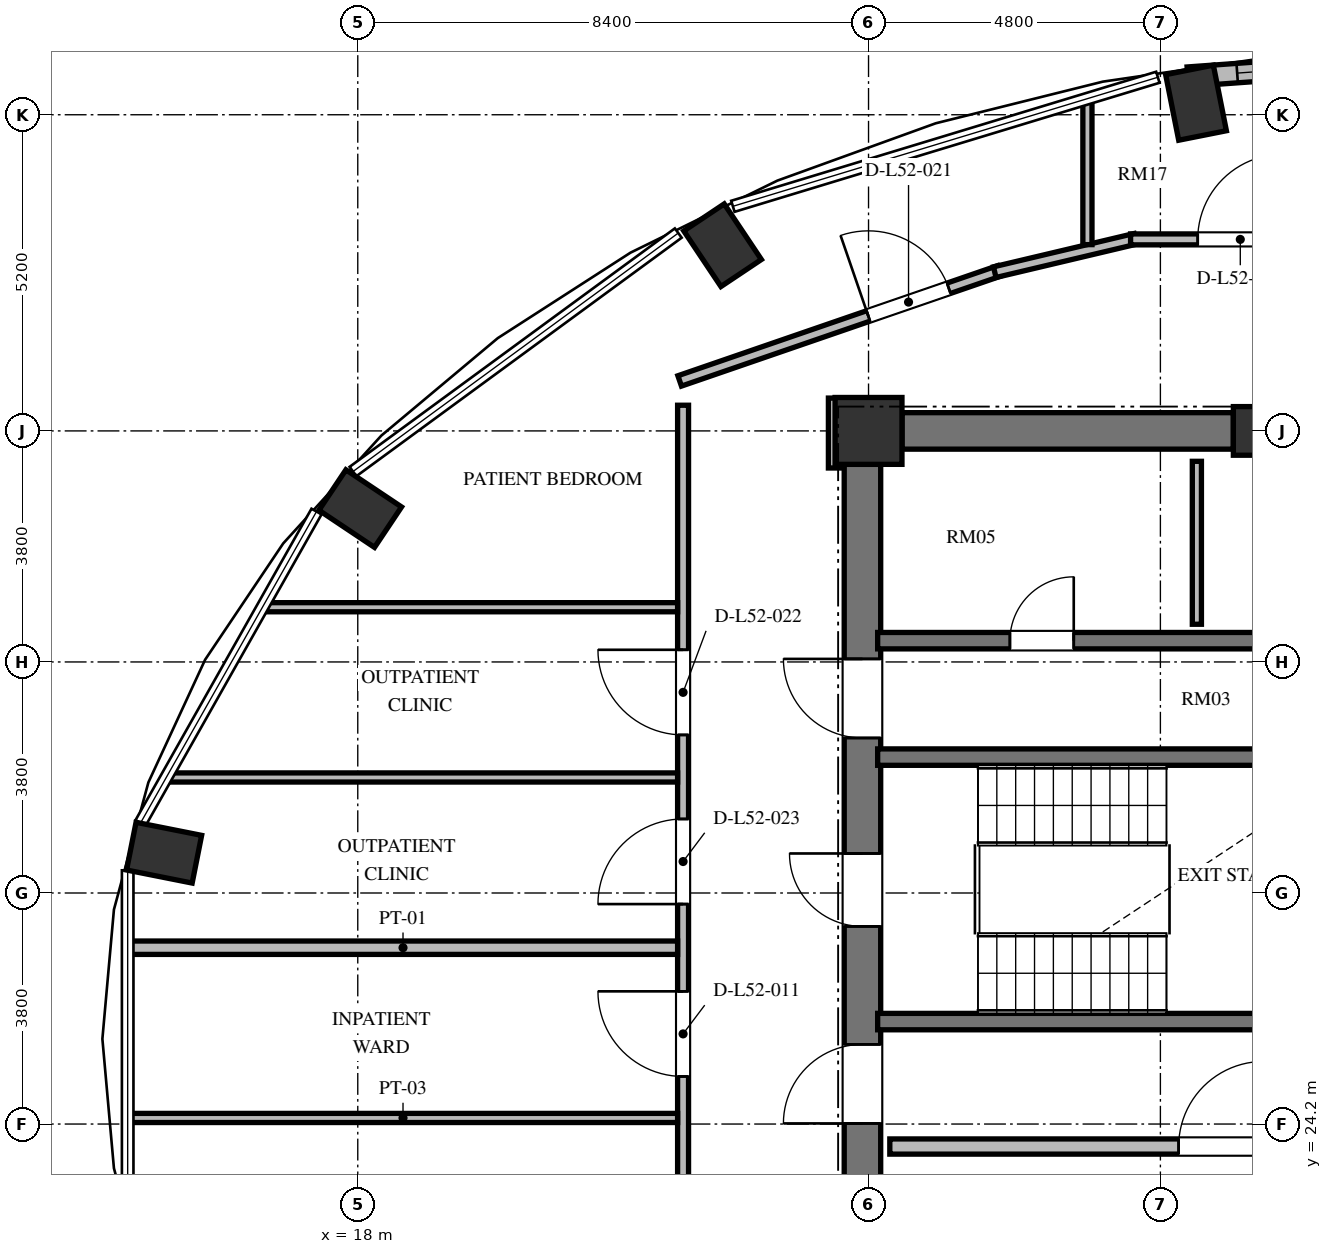
"""IFC4 building model, lengths in metres.
Left out: names, types, materials, properties, quantities, classifications, styles, units other than length and angle.
Written with IfcOpenShell. Run it as: python <this file> out.ifc"""

import sys

from ifc_helpers import new_model, si_unit, direction, frame, frame_2d, origin, origin_2d, place, context, subcontext, project, spatial, rectangle, extrude, element, fill, save


model = new_model("IFC4")
c1 = context("Model", 3, precision=1e-05, world=origin(), true_north=direction((0.0, 1.0)))
c2 = subcontext(c1, "Body", "Model", "MODEL_VIEW")
j1 = project(units=[si_unit("LENGTHUNIT", "METRE"), si_unit("PLANEANGLEUNIT", "RADIAN")], contexts=[c1])
p1 = place(None, origin())
s1 = spatial("IfcSite", under=j1, at=p1, CompositionType="ELEMENT")
p2 = place(p1, origin())
s2 = spatial("IfcBuilding", under=s1, at=p2, CompositionType="ELEMENT")
p3 = place(p2, frame((0.0, 0.0, 202.128)))
s3 = spatial("IfcBuildingStorey", under=s2, at=p3, CompositionType="ELEMENT", Elevation=202.128)
for number, where, z_axis, x_axis in (
    (1, (31.786, 40.998, 0.0), (0.0, 0.0, 1.0), (-0.195, 0.981, 0.0)),
    (2, (24.0, 38.654, 0.0), (0.0, 0.0, 1.0), (-0.556, 0.831, 0.0)),
    (3, (18.04, 34.323, 0.0), (0.0, 0.0, 1.0), (-0.831, 0.556, 0.0)),
    (4, (14.815, 28.663, 0.0), (0.0, 0.0, 1.0), (-0.981, 0.195, 0.0)),
):
    element("IfcColumn", number, at=place(p3, frame(where, z_axis=z_axis, x_axis=x_axis)), inside=s3, PredefinedType="COLUMN", context=c2, shape_type="SweptSolid", body=[
        extrude(rectangle(XDim=1.1, YDim=0.8, at=origin_2d()), origin(), (0.0, 0.0, 1.0), 3.648),
    ])
p4 = place(p3, frame((32.8, 35.6, 0.0), z_axis=(0.0, 0.0, 1.0), x_axis=(1.0, 0.0, 0.0)))
e5 = element("IfcColumn", 5, at=p4, inside=s3, PredefinedType="COLUMN", context=c2, shape_type="SweptSolid", body=[
    extrude(rectangle(XDim=0.8, YDim=0.8, at=origin_2d()), origin(), (0.0, 0.0, 1.0), 3.648),
])
p5 = place(p3, frame((26.4, 35.6, 0.0), z_axis=(0.0, 0.0, 1.0), x_axis=(1.0, 0.0, 0.0)))
e6 = element("IfcColumn", 6, at=p5, inside=s3, PredefinedType="COLUMN", context=c2, shape_type="SweptSolid", body=[
    extrude(rectangle(XDim=1.1, YDim=1.1, at=origin_2d()), origin(), (0.0, 0.0, 1.0), 3.648),
])
p6 = place(p3, frame((26.3, 20.95, 0.0), z_axis=(0.0, 0.0, 1.0), x_axis=(0.0, 1.0, 0.0)))
e7 = element("IfcWall", 7, at=p6, inside=s3, PredefinedType="SHEAR", context=c2, shape_type="SweptSolid", body=[
    extrude(rectangle(XDim=14.1, YDim=0.6, at=frame_2d((7.05, 0.0))), origin(), (0.0, 0.0, 1.0), 3.648),
])
p7 = place(p6, frame((6.5, 0.0, 0.0)))
e8 = element("IfcOpeningElement", 8, at=p7, cuts=e7, PredefinedType="OPENING", context=c2, shape_type="SweptSolid", body=[
    extrude(rectangle(XDim=1.2, YDim=2.15, at=frame_2d((0.6, 1.075))), frame((0.0, 0.31, 0.0), z_axis=(0.0, -1.0, 0.0), x_axis=(1.0, 0.0, 0.0)), (0.0, 0.0, 1.0), 0.62),
])
p8 = place(p6, frame((9.6, 0.0, 0.0)))
e9 = element("IfcOpeningElement", 9, at=p8, cuts=e7, PredefinedType="OPENING", context=c2, shape_type="SweptSolid", body=[
    extrude(rectangle(XDim=1.3, YDim=2.2, at=frame_2d((0.65, 1.1))), frame((0.0, 0.31, 0.0), z_axis=(0.0, -1.0, 0.0), x_axis=(1.0, 0.0, 0.0)), (0.0, 0.0, 1.0), 0.62),
])
p9 = place(p6, frame((3.26, 0.0, 0.0)))
e10 = element("IfcOpeningElement", 10, at=p9, cuts=e7, PredefinedType="OPENING", context=c2, shape_type="SweptSolid", body=[
    extrude(rectangle(XDim=1.3, YDim=2.2, at=frame_2d((0.65, 1.1))), frame((0.0, 0.31, 0.0), z_axis=(0.0, -1.0, 0.0), x_axis=(1.0, 0.0, 0.0)), (0.0, 0.0, 1.0), 0.62),
])
p10 = place(p3, frame((26.95, 35.6, 0.0), z_axis=(0.0, 0.0, 1.0), x_axis=(1.0, 0.0, 0.0)))
e11 = element("IfcWall", 11, at=p10, inside=s3, PredefinedType="SHEAR", context=c2, shape_type="SweptSolid", body=[
    extrude(rectangle(XDim=5.45, YDim=0.6, at=frame_2d((2.725, 0.0))), origin(), (0.0, 0.0, 1.0), 3.648),
])
p11 = place(p3, frame((36.179, 41.753, 0.0), z_axis=(0.0, 0.0, 1.0), x_axis=(-0.997408782787, -0.071942477163, 0.0)))
e12 = element("IfcWall", 12, at=p11, inside=s3, PredefinedType="SOLIDWALL", context=c2, shape_type="SweptSolid", body=[
    extrude(rectangle(XDim=4.541, YDim=0.32, at=frame_2d((2.27, 0.0))), origin(), (0.0, 0.0, 1.0), 3.448),
])
p12 = place(p11, frame((2.526, 0.0, 0.85)))
e13 = element("IfcOpeningElement", 13, at=p12, cuts=e12, PredefinedType="OPENING", context=c2, shape_type="SweptSolid", body=[
    extrude(rectangle(XDim=1.2, YDim=1.8, at=frame_2d((0.6, 0.9))), frame((0.0, 0.17, 0.0), z_axis=(0.0, -1.0, 0.0), x_axis=(1.0, 0.0, 0.0)), (0.0, 0.0, 1.0), 0.34),
])
for number, where, z_axis, x_axis in (
    (14, (26.55, 30.235, 0.0), (0.0, 0.0, 1.0), (1.0, 0.0, 0.0)),
    (15, (26.55, 25.885, 0.0), (0.0, 0.0, 1.0), (1.0, 0.0, 0.0)),
):
    element("IfcWall", number, at=place(p3, frame(where, z_axis=z_axis, x_axis=x_axis)), inside=s3, PredefinedType="SHEAR", context=c2, shape_type="SweptSolid", body=[
        extrude(rectangle(XDim=7.985, YDim=0.27, at=frame_2d((3.992, 0.0))), origin(), (0.0, 0.0, 1.0), 3.648),
    ])
p13 = place(p3, frame((26.55, 32.15, 0.0), z_axis=(0.0, 0.0, 1.0), x_axis=(1.0, 0.0, 0.0)))
e16 = element("IfcWall", 16, at=p13, inside=s3, PredefinedType="SHEAR", context=c2, shape_type="SweptSolid", body=[
    extrude(rectangle(XDim=16.4, YDim=0.27, at=frame_2d((8.2, 0.0))), origin(), (0.0, 0.0, 1.0), 3.648),
])
p14 = place(p13, frame((2.175, 0.0, 0.0)))
e17 = element("IfcOpeningElement", 17, at=p14, cuts=e16, PredefinedType="OPENING", context=c2, shape_type="SweptSolid", body=[
    extrude(rectangle(XDim=1.05, YDim=2.15, at=frame_2d((0.525, 1.075))), frame((0.0, 0.145, 0.0), z_axis=(0.0, -1.0, 0.0), x_axis=(1.0, 0.0, 0.0)), (0.0, 0.0, 1.0), 0.29),
])
p15 = place(p13, frame((7.575, 0.0, 0.0)))
e18 = element("IfcOpeningElement", 18, at=p15, cuts=e16, PredefinedType="OPENING", context=c2, shape_type="SweptSolid", body=[
    extrude(rectangle(XDim=1.05, YDim=2.15, at=frame_2d((0.525, 1.075))), frame((0.0, 0.145, 0.0), z_axis=(0.0, -1.0, 0.0), x_axis=(1.0, 0.0, 0.0)), (0.0, 0.0, 1.0), 0.29),
])
p16 = place(p13, frame((11.9, 0.0, 0.0)))
e19 = element("IfcOpeningElement", 19, at=p16, cuts=e16, PredefinedType="OPENING", context=c2, shape_type="SweptSolid", body=[
    extrude(rectangle(XDim=1.1, YDim=2.2, at=frame_2d((0.55, 1.1))), frame((0.0, 0.145, 0.0), z_axis=(0.0, -1.0, 0.0), x_axis=(1.0, 0.0, 0.0)), (0.0, 0.0, 1.0), 0.29),
])
p17 = place(p13, frame((14.5, 0.0, 0.0)))
e20 = element("IfcOpeningElement", 20, at=p17, cuts=e16, PredefinedType="OPENING", context=c2, shape_type="SweptSolid", body=[
    extrude(rectangle(XDim=1.1, YDim=2.2, at=frame_2d((0.55, 1.1))), frame((0.0, 0.145, 0.0), z_axis=(0.0, -1.0, 0.0), x_axis=(1.0, 0.0, 0.0)), (0.0, 0.0, 1.0), 0.29),
])
p18 = place(p3, frame((26.75, 23.83, 0.0), z_axis=(0.0, 0.0, 1.0), x_axis=(1.0, 0.0, 0.0)))
e21 = element("IfcWall", 21, at=p18, inside=s3, PredefinedType="SOLIDWALL", context=c2, shape_type="SweptSolid", body=[
    extrude(rectangle(XDim=16.2, YDim=0.25, at=frame_2d((8.1, 0.0))), origin(), (0.0, 0.0, 1.0), 3.448),
])
p19 = place(p18, frame((4.75, 0.0, 0.0)))
e22 = element("IfcOpeningElement", 22, at=p19, cuts=e21, PredefinedType="OPENING", context=c2, shape_type="SweptSolid", body=[
    extrude(rectangle(XDim=1.4, YDim=2.2, at=frame_2d((0.7, 1.1))), frame((0.0, 0.135, 0.0), z_axis=(0.0, -1.0, 0.0), x_axis=(1.0, 0.0, 0.0)), (0.0, 0.0, 1.0), 0.27),
])
p20 = place(p18, frame((11.7, 0.0, 0.0)))
e23 = element("IfcOpeningElement", 23, at=p20, cuts=e21, PredefinedType="OPENING", context=c2, shape_type="SweptSolid", body=[
    extrude(rectangle(XDim=1.1, YDim=2.2, at=frame_2d((0.55, 1.1))), frame((0.0, 0.135, 0.0), z_axis=(0.0, -1.0, 0.0), x_axis=(1.0, 0.0, 0.0)), (0.0, 0.0, 1.0), 0.27),
])
p21 = place(p18, frame((14.15, 0.0, 0.0)))
e24 = element("IfcOpeningElement", 24, at=p21, cuts=e21, PredefinedType="OPENING", context=c2, shape_type="SweptSolid", body=[
    extrude(rectangle(XDim=1.4, YDim=2.3, at=frame_2d((0.7, 1.15))), frame((0.0, 0.135, 0.0), z_axis=(0.0, -1.0, 0.0), x_axis=(1.0, 0.0, 0.0)), (0.0, 0.0, 1.0), 0.27),
])
p22 = place(p3, frame((31.8, 32.42, 0.0), z_axis=(0.0, 0.0, 1.0), x_axis=(0.0, 1.0, 0.0)))
e25 = element("IfcWall", 25, at=p22, inside=s3, PredefinedType="PARTITIONING", context=c2, shape_type="SweptSolid", body=[
    extrude(rectangle(XDim=2.68, YDim=0.15, at=frame_2d((1.34, 0.0))), origin(), (0.0, 0.0, 1.0), 3.448),
])
p23 = place(p3, frame((23.294, 36.422, 0.0), z_axis=(0.0, 0.0, 1.0), x_axis=(0.945493277461, 0.325641616316, 0.0)))
e26 = element("IfcWall", 26, at=p23, inside=s3, PredefinedType="PARTITIONING", context=c2, shape_type="SweptSolid", body=[
    extrude(rectangle(XDim=5.562, YDim=0.18, at=frame_2d((2.781, 0.0))), origin(), (0.0, 0.0, 1.0), 3.073),
])
p24 = place(p23, frame((3.281, 0.0, 0.0)))
e27 = element("IfcOpeningElement", 27, at=p24, cuts=e26, PredefinedType="OPENING", context=c2, shape_type="SweptSolid", body=[
    extrude(rectangle(XDim=1.4, YDim=2.2, at=frame_2d((0.7, 1.1))), frame((0.0, 0.1, 0.0), z_axis=(0.0, -1.0, 0.0), x_axis=(1.0, 0.0, 0.0)), (0.0, 0.0, 1.0), 0.2),
])
p25 = place(p3, frame((28.476, 38.211, 0.0), z_axis=(0.0, 0.0, 1.0), x_axis=(0.973030562203, 0.230676234189, 0.0)))
e28 = element("IfcWall", 28, at=p25, inside=s3, PredefinedType="PARTITIONING", context=c2, shape_type="SweptSolid", body=[
    extrude(rectangle(XDim=2.377, YDim=0.18, at=frame_2d((1.188, 0.0))), origin(), (0.0, 0.0, 1.0), 3.448),
])
p26 = place(p3, frame((30.71, 38.75, 0.0), z_axis=(0.0, 0.0, 1.0), x_axis=(1.0, 0.0, 0.0)))
e29 = element("IfcWall", 29, at=p26, inside=s3, PredefinedType="PARTITIONING", context=c2, shape_type="SweptSolid", body=[
    extrude(rectangle(XDim=20.815, YDim=0.18, at=frame_2d((10.408, 0.0))), origin(), (0.0, 0.0, 1.0), 3.073),
])
p27 = place(p26, frame((17.194, 0.0, 0.0)))
e30 = element("IfcOpeningElement", 30, at=p27, cuts=e29, PredefinedType="OPENING", context=c2, shape_type="SweptSolid", body=[
    extrude(rectangle(XDim=1.4, YDim=2.2, at=frame_2d((0.7, 1.1))), frame((0.0, 0.1, 0.0), z_axis=(0.0, -1.0, 0.0), x_axis=(1.0, 0.0, 0.0)), (0.0, 0.0, 1.0), 0.2),
])
p28 = place(p26, frame((12.59, 0.0, 0.0)))
e31 = element("IfcOpeningElement", 31, at=p28, cuts=e29, PredefinedType="OPENING", context=c2, shape_type="SweptSolid", body=[
    extrude(rectangle(XDim=1.4, YDim=2.2, at=frame_2d((0.7, 1.1))), frame((0.0, 0.1, 0.0), z_axis=(0.0, -1.0, 0.0), x_axis=(1.0, 0.0, 0.0)), (0.0, 0.0, 1.0), 0.2),
])
p29 = place(p26, frame((8.59, 0.0, 0.0)))
e32 = element("IfcOpeningElement", 32, at=p29, cuts=e29, PredefinedType="OPENING", context=c2, shape_type="SweptSolid", body=[
    extrude(rectangle(XDim=1.4, YDim=2.2, at=frame_2d((0.7, 1.1))), frame((0.0, 0.1, 0.0), z_axis=(0.0, -1.0, 0.0), x_axis=(1.0, 0.0, 0.0)), (0.0, 0.0, 1.0), 0.2),
])
p30 = place(p26, frame((4.59, 0.0, 0.0)))
e33 = element("IfcOpeningElement", 33, at=p30, cuts=e29, PredefinedType="OPENING", context=c2, shape_type="SweptSolid", body=[
    extrude(rectangle(XDim=1.4, YDim=2.2, at=frame_2d((0.7, 1.1))), frame((0.0, 0.1, 0.0), z_axis=(0.0, -1.0, 0.0), x_axis=(1.0, 0.0, 0.0)), (0.0, 0.0, 1.0), 0.2),
])
p31 = place(p26, frame((1.104, 0.0, 0.0)))
e34 = element("IfcOpeningElement", 34, at=p31, cuts=e29, PredefinedType="OPENING", context=c2, shape_type="SweptSolid", body=[
    extrude(rectangle(XDim=1.4, YDim=2.2, at=frame_2d((0.7, 1.1))), frame((0.0, 0.1, 0.0), z_axis=(0.0, -1.0, 0.0), x_axis=(1.0, 0.0, 0.0)), (0.0, 0.0, 1.0), 0.2),
])
p32 = place(p3, frame((25.83, 36.14, 0.0), z_axis=(0.0, 0.0, 1.0), x_axis=(0.0, -1.0, 0.0)))
e35 = element("IfcWall", 35, at=p32, inside=s3, PredefinedType="PARTITIONING", context=c2, shape_type="SweptSolid", body=[
    extrude(rectangle(XDim=1.15, YDim=0.18, at=frame_2d((0.575, 0.0))), origin(), (0.0, 0.0, 1.0), 3.448),
])
p33 = place(p3, frame((23.35, 19.98, 0.0), z_axis=(0.0, 0.0, 1.0), x_axis=(0.0, 1.0, 0.0)))
e36 = element("IfcWall", 36, at=p33, inside=s3, PredefinedType="PARTITIONING", context=c2, shape_type="SweptSolid", body=[
    extrude(rectangle(XDim=16.042, YDim=0.18, at=frame_2d((8.021, 0.0))), origin(), (0.0, 0.0, 1.0), 3.448),
])
p34 = place(p33, frame((5.002, 0.0, 0.0)))
e37 = element("IfcOpeningElement", 37, at=p34, cuts=e36, PredefinedType="OPENING", context=c2, shape_type="SweptSolid", body=[
    extrude(rectangle(XDim=1.4, YDim=2.2, at=frame_2d((0.7, 1.1))), frame((0.0, 0.1, 0.0), z_axis=(0.0, -1.0, 0.0), x_axis=(1.0, 0.0, 0.0)), (0.0, 0.0, 1.0), 0.2),
])
p35 = place(p33, frame((1.794, 0.0, 0.0)))
e38 = element("IfcOpeningElement", 38, at=p35, cuts=e36, PredefinedType="OPENING", context=c2, shape_type="SweptSolid", body=[
    extrude(rectangle(XDim=1.05, YDim=2.15, at=frame_2d((0.525, 1.075))), frame((0.0, 0.1, 0.0), z_axis=(0.0, -1.0, 0.0), x_axis=(1.0, 0.0, 0.0)), (0.0, 0.0, 1.0), 0.2),
])
p36 = place(p33, frame((10.62, 0.0, 0.0)))
e39 = element("IfcOpeningElement", 39, at=p36, cuts=e36, PredefinedType="OPENING", context=c2, shape_type="SweptSolid", body=[
    extrude(rectangle(XDim=1.4, YDim=2.2, at=frame_2d((0.7, 1.1))), frame((0.0, 0.1, 0.0), z_axis=(0.0, -1.0, 0.0), x_axis=(1.0, 0.0, 0.0)), (0.0, 0.0, 1.0), 0.2),
])
p37 = place(p33, frame((7.837, 0.0, 0.0)))
e40 = element("IfcOpeningElement", 40, at=p37, cuts=e36, PredefinedType="OPENING", context=c2, shape_type="SweptSolid", body=[
    extrude(rectangle(XDim=1.4, YDim=2.2, at=frame_2d((0.7, 1.1))), frame((0.0, 0.1, 0.0), z_axis=(0.0, -1.0, 0.0), x_axis=(1.0, 0.0, 0.0)), (0.0, 0.0, 1.0), 0.2),
])
p38 = place(p3, frame((14.228, 24.3, 0.0), z_axis=(0.0, 0.0, 1.0), x_axis=(1.0, 0.0, 0.0)))
e41 = element("IfcWall", 41, at=p38, inside=s3, PredefinedType="PARTITIONING", context=c2, shape_type="SweptSolid", body=[
    extrude(rectangle(XDim=9.032, YDim=0.15, at=frame_2d((4.516, 0.0))), origin(), (0.0, 0.0, 1.0), 3.448),
])
p39 = place(p3, frame((14.228, 27.1, 0.0), z_axis=(0.0, 0.0, 1.0), x_axis=(1.0, 0.0, 0.0)))
e42 = element("IfcWall", 42, at=p39, inside=s3, PredefinedType="PARTITIONING", context=c2, shape_type="SweptSolid", body=[
    extrude(rectangle(XDim=9.032, YDim=0.22, at=frame_2d((4.516, 0.0))), origin(), (0.0, 0.0, 1.0), 3.448),
])
p40 = place(p3, frame((14.861, 29.9, 0.0), z_axis=(0.0, 0.0, 1.0), x_axis=(1.0, 0.0, 0.0)))
e43 = element("IfcWall", 43, at=p40, inside=s3, PredefinedType="PARTITIONING", context=c2, shape_type="SweptSolid", body=[
    extrude(rectangle(XDim=8.399, YDim=0.15, at=frame_2d((4.2, 0.0))), origin(), (0.0, 0.0, 1.0), 3.448),
])
p41 = place(p3, frame((16.443, 32.7, 0.0), z_axis=(0.0, 0.0, 1.0), x_axis=(1.0, 0.0, 0.0)))
e44 = element("IfcWall", 44, at=p41, inside=s3, PredefinedType="PARTITIONING", context=c2, shape_type="SweptSolid", body=[
    extrude(rectangle(XDim=6.817, YDim=0.15, at=frame_2d((3.409, 0.0))), origin(), (0.0, 0.0, 1.0), 3.448),
])
p42 = place(p3, frame((30.0, 38.664, 0.0), z_axis=(0.0, 0.0, 1.0), x_axis=(0.0, 1.0, 0.0)))
e45 = element("IfcWall", 45, at=p42, inside=s3, PredefinedType="PARTITIONING", context=c2, shape_type="SweptSolid", body=[
    extrude(rectangle(XDim=2.384, YDim=0.15, at=frame_2d((1.192, 0.0))), origin(), (0.0, 0.0, 1.0), 3.448),
])
p43 = place(p12, origin())
e46 = element("IfcWindow", 46, at=p43, inside=s3, PartitioningType="SINGLE_PANEL", PredefinedType="WINDOW", context=c2, shape_type="SweptSolid", body=[
    extrude(rectangle(XDim=1.2, YDim=1.8, at=frame_2d((0.6, 0.9))), frame((0.0, 0.03, 0.0), z_axis=(0.0, -1.0, 0.0), x_axis=(1.0, 0.0, 0.0)), (0.0, 0.0, 1.0), 0.06),
])
fill(e13, e46)
p44 = place(p7, origin())
e47 = element("IfcDoor", 47, at=p44, inside=s3, OperationType="SINGLE_SWING_RIGHT", PredefinedType="DOOR", context=c2, shape_type="SweptSolid", body=[
    extrude(rectangle(XDim=1.2, YDim=2.15, at=frame_2d((0.6, 1.075))), frame((0.0, 0.025, 0.0), z_axis=(0.0, -1.0, 0.0), x_axis=(1.0, 0.0, 0.0)), (0.0, 0.0, 1.0), 0.05),
])
fill(e8, e47)
p45 = place(p8, origin())
e48 = element("IfcDoor", 48, at=p45, inside=s3, OperationType="SINGLE_SWING_RIGHT", PredefinedType="DOOR", context=c2, shape_type="SweptSolid", body=[
    extrude(rectangle(XDim=1.3, YDim=2.2, at=frame_2d((0.65, 1.1))), frame((0.0, 0.025, 0.0), z_axis=(0.0, -1.0, 0.0), x_axis=(1.0, 0.0, 0.0)), (0.0, 0.0, 1.0), 0.05),
])
fill(e9, e48)
p46 = place(p9, origin())
e49 = element("IfcDoor", 49, at=p46, inside=s3, OperationType="SINGLE_SWING_LEFT", PredefinedType="DOOR", context=c2, shape_type="SweptSolid", body=[
    extrude(rectangle(XDim=1.3, YDim=2.2, at=frame_2d((0.65, 1.1))), frame((0.0, 0.025, 0.0), z_axis=(0.0, -1.0, 0.0), x_axis=(1.0, 0.0, 0.0)), (0.0, 0.0, 1.0), 0.05),
])
fill(e10, e49)
p47 = place(p14, origin())
e50 = element("IfcDoor", 50, at=p47, inside=s3, OperationType="SINGLE_SWING_RIGHT", PredefinedType="DOOR", context=c2, shape_type="SweptSolid", body=[
    extrude(rectangle(XDim=1.05, YDim=2.15, at=frame_2d((0.525, 1.075))), frame((0.0, 0.025, 0.0), z_axis=(0.0, -1.0, 0.0), x_axis=(1.0, 0.0, 0.0)), (0.0, 0.0, 1.0), 0.05),
])
fill(e17, e50)
p48 = place(p19, origin())
e51 = element("IfcDoor", 51, at=p48, inside=s3, OperationType="SINGLE_SWING_RIGHT", PredefinedType="DOOR", context=c2, shape_type="SweptSolid", body=[
    extrude(rectangle(XDim=1.4, YDim=2.2, at=frame_2d((0.7, 1.1))), frame((0.0, 0.025, 0.0), z_axis=(0.0, -1.0, 0.0), x_axis=(1.0, 0.0, 0.0)), (0.0, 0.0, 1.0), 0.05),
])
fill(e22, e51)
p49 = place(p34, origin())
e52 = element("IfcDoor", 52, at=p49, inside=s3, OperationType="SINGLE_SWING_RIGHT", PredefinedType="DOOR", context=c2, shape_type="SweptSolid", body=[
    extrude(rectangle(XDim=1.4, YDim=2.2, at=frame_2d((0.7, 1.1))), frame((0.0, 0.025, 0.0), z_axis=(0.0, -1.0, 0.0), x_axis=(1.0, 0.0, 0.0)), (0.0, 0.0, 1.0), 0.05),
])
fill(e37, e52)
p50 = place(p31, origin())
e53 = element("IfcDoor", 53, at=p50, inside=s3, OperationType="SINGLE_SWING_RIGHT", PredefinedType="DOOR", context=c2, shape_type="SweptSolid", body=[
    extrude(rectangle(XDim=1.4, YDim=2.2, at=frame_2d((0.7, 1.1))), frame((0.0, 0.025, 0.0), z_axis=(0.0, -1.0, 0.0), x_axis=(1.0, 0.0, 0.0)), (0.0, 0.0, 1.0), 0.05),
])
fill(e34, e53)
p51 = place(p24, origin())
e54 = element("IfcDoor", 54, at=p51, inside=s3, OperationType="SINGLE_SWING_LEFT", PredefinedType="DOOR", context=c2, shape_type="SweptSolid", body=[
    extrude(rectangle(XDim=1.4, YDim=2.2, at=frame_2d((0.7, 1.1))), frame((0.0, 0.025, 0.0), z_axis=(0.0, -1.0, 0.0), x_axis=(1.0, 0.0, 0.0)), (0.0, 0.0, 1.0), 0.05),
])
fill(e27, e54)
p52 = place(p36, origin())
e55 = element("IfcDoor", 55, at=p52, inside=s3, OperationType="SINGLE_SWING_RIGHT", PredefinedType="DOOR", context=c2, shape_type="SweptSolid", body=[
    extrude(rectangle(XDim=1.4, YDim=2.2, at=frame_2d((0.7, 1.1))), frame((0.0, 0.025, 0.0), z_axis=(0.0, -1.0, 0.0), x_axis=(1.0, 0.0, 0.0)), (0.0, 0.0, 1.0), 0.05),
])
fill(e39, e55)
p53 = place(p37, origin())
e56 = element("IfcDoor", 56, at=p53, inside=s3, OperationType="SINGLE_SWING_LEFT", PredefinedType="DOOR", context=c2, shape_type="SweptSolid", body=[
    extrude(rectangle(XDim=1.4, YDim=2.2, at=frame_2d((0.7, 1.1))), frame((0.0, 0.025, 0.0), z_axis=(0.0, -1.0, 0.0), x_axis=(1.0, 0.0, 0.0)), (0.0, 0.0, 1.0), 0.05),
])
fill(e40, e56)
save(model, sys.argv[1])
